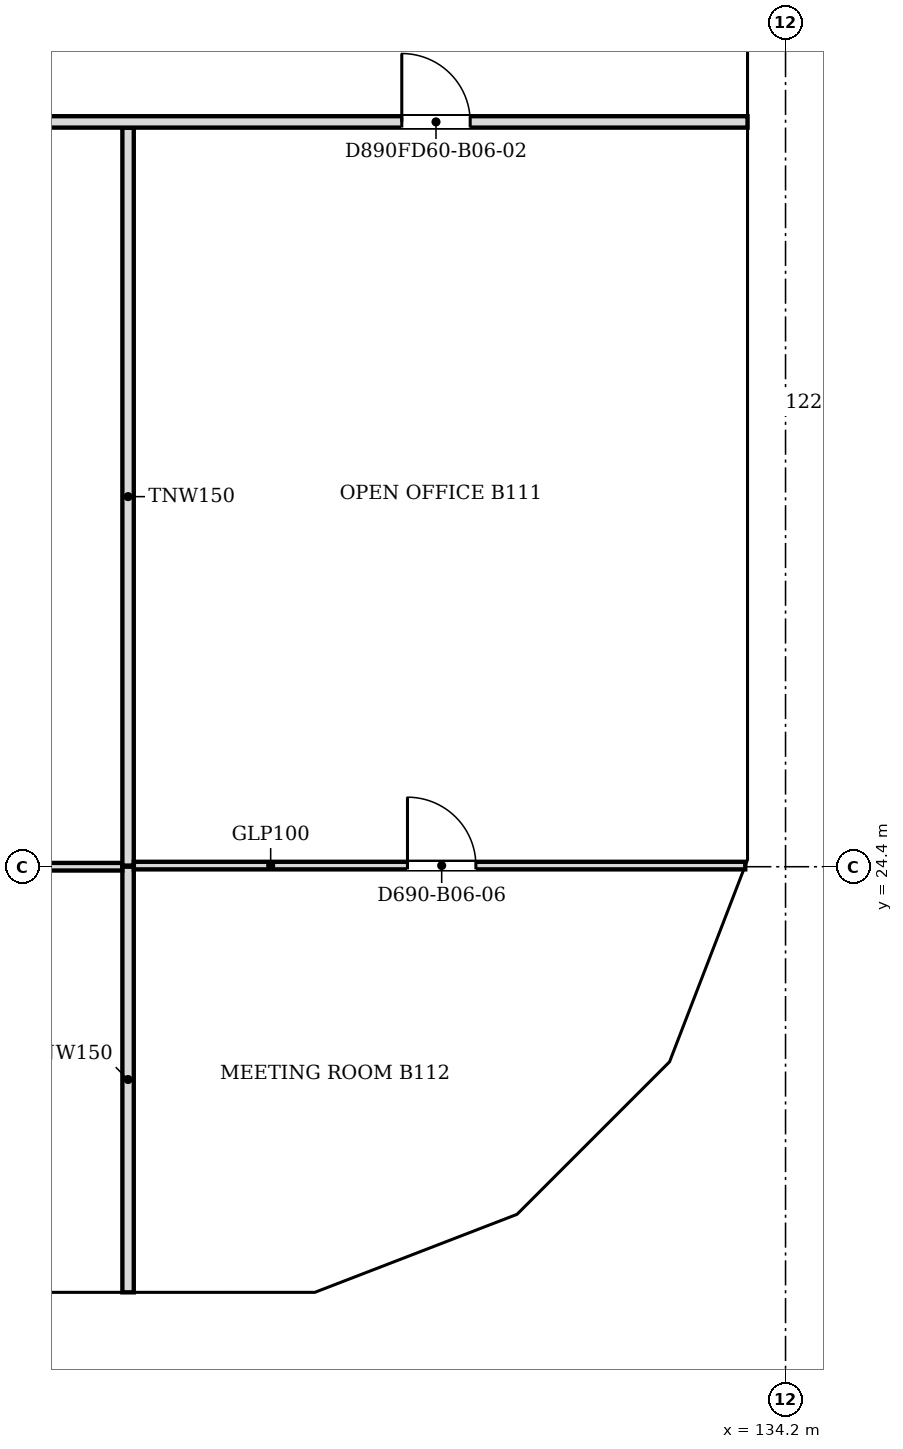
"""IFC4 building model, lengths in metres.
Left out: names, types, materials, properties, quantities, classifications, styles, units other than length and angle.
Written with IfcOpenShell. Run it as: python <this file> out.ifc"""

import sys

from ifc_helpers import new_model, si_unit, direction, frame, frame_2d, origin, place, context, subcontext, project, spatial, polyline, rectangle, outline, extrude, faceted_brep, source, transform, mapped, element, fill, save


model = new_model("IFC4")
c1 = context("Model", 3, precision=1e-05, world=origin(), true_north=direction((0.0, 1.0)))
c2 = subcontext(c1, "Body", "Model", "MODEL_VIEW")
j1 = project(units=[si_unit("LENGTHUNIT", "METRE"), si_unit("PLANEANGLEUNIT", "RADIAN")], contexts=[c1])
p1 = place(None, origin())
s1 = spatial("IfcSite", under=j1, at=p1, CompositionType="ELEMENT")
p2 = place(p1, origin())
s2 = spatial("IfcBuilding", under=s1, at=p2, CompositionType="ELEMENT")
p3 = place(p2, frame((0.0, 0.0, 56.2)))
s3 = spatial("IfcBuildingStorey", under=s2, at=p3, CompositionType="ELEMENT", Elevation=56.2)
m1 = source(origin(), c2, "Body", "SweptSolid", [
    extrude(outline(polyline([(3.05, 0.0), (6.1, 3.8), (3.05, 7.6), (0.0, 3.8), (3.05, 0.0)])), frame((0.0, 0.25, 0.0), z_axis=(0.0, -1.0, 0.0), x_axis=(1.0, 0.0, 0.0)), (0.0, 0.0, 1.0), 0.5),
])
p4 = place(p3, frame((118.95, 18.55, -3.8), z_axis=(0.0, 0.0, 1.0), x_axis=(1.0, 0.0, 0.0)))
e1 = element("IfcWall", 1, at=p4, inside=s3, PredefinedType="SOLIDWALL", context=c2, shape_type="MappedRepresentation", body=[
    mapped(m1, transform((0.0, 0.0, 0.0), scale=1.0)),
])
m2 = source(origin(), c2, "Body", "SweptSolid", [
    extrude(outline(polyline([(3.05, 0.399), (5.78, 3.8), (3.05, 7.201), (0.321, 3.8), (3.05, 0.399)])), frame((0.0, 0.26, 0.0), z_axis=(0.0, -1.0, 0.0), x_axis=(1.0, 0.0, 0.0)), (0.0, 0.0, 1.0), 0.52),
])
p5 = place(p4, origin())
e2 = element("IfcOpeningElement", 2, at=p5, cuts=e1, PredefinedType="OPENING", context=c2, shape_type="MappedRepresentation", body=[
    mapped(m2, transform((0.0, 0.0, 0.0), scale=1.0)),
])
m3 = source(origin(), c2, "Body", "Brep", [
    faceted_brep([(3.003, -0.25, 0.0), (3.05, -0.25, 0.06), (3.05, -0.25, 7.54), (3.003, -0.25, 7.6), (0.0, -0.25, 3.8), (0.0, 0.25, 3.8), (2.957, 0.25, 7.541), (2.957, 0.25, 0.059), (3.003, 0.0, 0.0), (3.003, 0.0, 7.6)], [[[0, 1, 2, 3, 4]], [[5, 6, 7]], [[1, 0, 8]], [[9, 3, 2]], [[6, 5, 4, 3, 9]], [[5, 7, 8, 0, 4]], [[1, 8, 7, 6, 9, 2]]]),
])
p6 = place(p3, frame((125.05, 18.55, -3.8), z_axis=(0.0, 0.0, 1.0), x_axis=(1.0, 0.0, 0.0)))
e3 = element("IfcWall", 3, at=p6, inside=s3, PredefinedType="SOLIDWALL", context=c2, shape_type="MappedRepresentation", body=[
    mapped(m3, transform((0.0, 0.0, 0.0), scale=1.0)),
])
m4 = source(origin(), c2, "Body", "SweptSolid", [
    extrude(outline(polyline([(2.803, 6.944), (0.319, 3.8), (2.803, 0.656), (2.803, 6.944)])), frame((0.0, 0.26, 0.0), z_axis=(0.0, -1.0, 0.0), x_axis=(1.0, 0.0, 0.0)), (0.0, 0.0, 1.0), 0.52),
])
p7 = place(p6, origin())
e4 = element("IfcOpeningElement", 4, at=p7, cuts=e3, PredefinedType="OPENING", context=c2, shape_type="MappedRepresentation", body=[
    mapped(m4, transform((0.0, 0.0, 0.0), scale=1.0)),
])
m5 = source(origin(), c2, "Body", "Brep", [
    faceted_brep([(0.047, -0.25, 0.0), (2.997, -0.25, 3.8), (0.047, -0.25, 7.6), (0.0, -0.25, 7.541), (0.0, -0.25, 0.059), (0.093, 0.25, 7.54), (2.944, 0.25, 3.868), (2.944, 0.25, 3.732), (0.093, 0.25, 0.06), (2.997, 0.0, 3.8), (0.047, 0.0, 0.0), (0.047, 0.0, 7.6)], [[[0, 1, 2, 3, 4]], [[5, 6, 7, 8]], [[8, 7, 9, 1, 0, 10]], [[6, 5, 11, 2, 1, 9]], [[3, 2, 11]], [[10, 0, 4]], [[8, 10, 4, 3, 11, 5]], [[9, 7, 6]]]),
])
p8 = place(p3, frame((128.01, 18.533, -3.8), z_axis=(0.0, 0.0, 1.0), x_axis=(0.932990326376, 0.359901446078, 0.0)))
e5 = element("IfcWall", 5, at=p8, inside=s3, PredefinedType="SOLIDWALL", context=c2, shape_type="MappedRepresentation", body=[
    mapped(m5, transform((0.0, 0.0, 0.0), scale=1.0)),
])
m6 = source(origin(), c2, "Body", "SweptSolid", [
    extrude(outline(polyline([(0.247, 0.665), (2.681, 3.8), (0.247, 6.935), (0.247, 0.665)])), frame((0.0, 0.26, 0.0), z_axis=(0.0, -1.0, 0.0), x_axis=(1.0, 0.0, 0.0)), (0.0, 0.0, 1.0), 0.52),
])
p9 = place(p8, origin())
e6 = element("IfcOpeningElement", 6, at=p9, cuts=e5, PredefinedType="OPENING", context=c2, shape_type="MappedRepresentation", body=[
    mapped(m6, transform((0.0, 0.0, 0.0), scale=1.0)),
])
m7 = source(origin(), c2, "Body", "Brep", [
    faceted_brep([(2.944, -0.25, 0.0), (2.997, -0.25, 0.068), (2.997, -0.25, 7.532), (2.944, -0.25, 7.6), (0.0, -0.25, 3.8), (0.053, 0.25, 3.868), (2.891, 0.25, 7.532), (2.891, 0.25, 0.068), (0.053, 0.25, 3.732), (2.944, 0.0, 0.0), (2.944, 0.0, 7.6), (0.0, 0.0, 3.8)], [[[0, 1, 2, 3, 4]], [[5, 6, 7, 8]], [[1, 0, 9]], [[10, 3, 2]], [[6, 5, 11, 4, 3, 10]], [[8, 7, 9, 0, 4, 11]], [[8, 11, 5]], [[1, 9, 7, 6, 10, 2]]]),
])
p10 = place(p3, frame((130.806, 19.612, -3.8), z_axis=(0.0, 0.0, 1.0), x_axis=(0.707106781187, 0.707106781187, 0.0)))
e7 = element("IfcWall", 7, at=p10, inside=s3, PredefinedType="SOLIDWALL", context=c2, shape_type="MappedRepresentation", body=[
    mapped(m7, transform((0.0, 0.0, 0.0), scale=1.0)),
])
m8 = source(origin(), c2, "Body", "SweptSolid", [
    extrude(outline(polyline([(2.744, 6.934), (0.316, 3.8), (2.744, 0.667), (2.744, 6.934)])), frame((0.0, 0.26, 0.0), z_axis=(0.0, -1.0, 0.0), x_axis=(1.0, 0.0, 0.0)), (0.0, 0.0, 1.0), 0.52),
])
p11 = place(p10, origin())
e8 = element("IfcOpeningElement", 8, at=p11, cuts=e7, PredefinedType="OPENING", context=c2, shape_type="MappedRepresentation", body=[
    mapped(m8, transform((0.0, 0.0, 0.0), scale=1.0)),
])
m9 = source(origin(), c2, "Body", "Brep", [
    faceted_brep([(0.053, -0.25, 0.0), (3.003, -0.25, 3.8), (0.053, -0.25, 7.6), (0.0, -0.25, 7.532), (0.0, -0.25, 0.068), (0.106, 0.25, 7.532), (2.957, 0.25, 3.86), (2.957, 0.25, 3.74), (0.106, 0.25, 0.068), (3.003, 0.0, 3.8), (0.053, 0.0, 0.0), (0.053, 0.0, 7.6)], [[[0, 1, 2, 3, 4]], [[5, 6, 7, 8]], [[8, 7, 9, 1, 0, 10]], [[6, 5, 11, 2, 1, 9]], [[3, 2, 11]], [[10, 0, 4]], [[8, 10, 4, 3, 11, 5]], [[9, 7, 6]]]),
])
p12 = place(p3, frame((132.869, 21.644, -3.8), z_axis=(0.0, 0.0, 1.0), x_axis=(0.359855894603, 0.933007896601, 0.0)))
e9 = element("IfcWall", 9, at=p12, inside=s3, PredefinedType="SOLIDWALL", context=c2, shape_type="MappedRepresentation", body=[
    mapped(m9, transform((0.0, 0.0, 0.0), scale=1.0)),
])
m10 = source(origin(), c2, "Body", "SweptSolid", [
    extrude(outline(polyline([(0.253, 0.665), (2.687, 3.8), (0.253, 6.935), (0.253, 0.665)])), frame((0.0, 0.26, 0.0), z_axis=(0.0, -1.0, 0.0), x_axis=(1.0, 0.0, 0.0)), (0.0, 0.0, 1.0), 0.52),
])
p13 = place(p12, origin())
e10 = element("IfcOpeningElement", 10, at=p13, cuts=e9, PredefinedType="OPENING", context=c2, shape_type="MappedRepresentation", body=[
    mapped(m10, transform((0.0, 0.0, 0.0), scale=1.0)),
])
m11 = source(origin(), c2, "Body", "Brep", [
    faceted_brep([(3.003, -0.25, 0.0), (6.053, -0.25, 3.8), (3.003, -0.25, 7.6), (0.0, -0.25, 3.8), (0.047, 0.25, 3.859), (3.003, 0.25, 7.6), (6.053, 0.25, 3.8), (3.003, 0.25, 0.0), (0.047, 0.25, 3.741), (0.0, 0.0, 3.8)], [[[0, 1, 2, 3]], [[4, 5, 6, 7, 8]], [[7, 6, 1, 0]], [[6, 5, 2, 1]], [[5, 4, 9, 3, 2]], [[8, 7, 0, 3, 9]], [[8, 9, 4]]]),
])
p14 = place(p3, frame((133.95, 24.447, -3.8), z_axis=(0.0, 0.0, 1.0), x_axis=(0.0, 1.0, 0.0)))
e11 = element("IfcWall", 11, at=p14, inside=s3, PredefinedType="SOLIDWALL", context=c2, shape_type="MappedRepresentation", body=[
    mapped(m11, transform((0.0, 0.0, 0.0), scale=1.0)),
])
m12 = source(origin(), c2, "Body", "SweptSolid", [
    extrude(outline(polyline([(3.005, 0.401), (5.733, 3.8), (3.005, 7.199), (0.319, 3.8), (3.005, 0.401)])), frame((0.0, 0.26, 0.0), z_axis=(0.0, -1.0, 0.0), x_axis=(1.0, 0.0, 0.0)), (0.0, 0.0, 1.0), 0.52),
])
p15 = place(p14, origin())
e12 = element("IfcOpeningElement", 12, at=p15, cuts=e11, PredefinedType="OPENING", context=c2, shape_type="MappedRepresentation", body=[
    mapped(m12, transform((0.0, 0.0, 0.0), scale=1.0)),
])
p16 = place(p3, frame((133.95, 30.5, -3.8), z_axis=(0.0, 0.0, 1.0), x_axis=(0.0, 1.0, 0.0)))
e13 = element("IfcWall", 13, at=p16, inside=s3, PredefinedType="SOLIDWALL", context=c2, shape_type="MappedRepresentation", body=[
    mapped(m1, transform((0.0, 0.0, 0.0), scale=1.0)),
])
p17 = place(p16, origin())
e14 = element("IfcOpeningElement", 14, at=p17, cuts=e13, PredefinedType="OPENING", context=c2, shape_type="MappedRepresentation", body=[
    mapped(m2, transform((0.0, 0.0, 0.0), scale=1.0)),
])
p18 = place(p2, frame((0.0, 0.0, 60.0)))
s4 = spatial("IfcBuildingStorey", under=s2, at=p18, CompositionType="ELEMENT", Elevation=60.0)
m13 = source(origin(), c2, "Body", "Brep", [
    faceted_brep([(3.05, -0.25, 0.0), (6.053, -0.25, 3.8), (3.05, -0.25, 7.6), (0.0, -0.25, 3.8), (0.0, 0.25, 3.8), (3.05, 0.25, 7.6), (6.007, 0.25, 3.859), (6.007, 0.25, 3.741), (3.05, 0.25, 0.0), (6.053, 0.0, 3.8)], [[[0, 1, 2, 3]], [[4, 5, 6, 7, 8]], [[8, 7, 9, 1, 0]], [[6, 5, 2, 1, 9]], [[5, 4, 3, 2]], [[4, 8, 0, 3]], [[9, 7, 6]]]),
])
p19 = place(p18, frame((122.0, 18.55, -3.8), z_axis=(0.0, 0.0, 1.0), x_axis=(1.0, 0.0, 0.0)))
e15 = element("IfcWall", 15, at=p19, inside=s4, PredefinedType="SOLIDWALL", context=c2, shape_type="MappedRepresentation", body=[
    mapped(m13, transform((0.0, 0.0, 0.0), scale=1.0)),
])
m14 = source(origin(), c2, "Body", "SweptSolid", [
    extrude(outline(polyline([(3.049, 0.401), (5.735, 3.8), (3.049, 7.199), (0.321, 3.8), (3.049, 0.401)])), frame((0.0, 0.26, 0.0), z_axis=(0.0, -1.0, 0.0), x_axis=(1.0, 0.0, 0.0)), (0.0, 0.0, 1.0), 0.52),
])
p20 = place(p19, origin())
e16 = element("IfcOpeningElement", 16, at=p20, cuts=e15, PredefinedType="OPENING", context=c2, shape_type="MappedRepresentation", body=[
    mapped(m14, transform((0.0, 0.0, 0.0), scale=1.0)),
])
m15 = source(origin(), c2, "Body", "Brep", [
    faceted_brep([(2.95, -0.25, 0.0), (3.003, -0.25, 0.068), (3.003, -0.25, 7.532), (2.95, -0.25, 7.6), (0.0, -0.25, 3.8), (0.047, 0.25, 3.86), (2.898, 0.25, 7.532), (2.898, 0.25, 0.068), (0.047, 0.25, 3.74), (2.95, 0.0, 0.0), (2.95, 0.0, 7.6), (0.0, 0.0, 3.8)], [[[0, 1, 2, 3, 4]], [[5, 6, 7, 8]], [[1, 0, 9]], [[10, 3, 2]], [[6, 5, 11, 4, 3, 10]], [[8, 7, 9, 0, 4, 11]], [[8, 11, 5]], [[1, 9, 7, 6, 10, 2]]]),
])
p21 = place(p18, frame((128.053, 18.55, -3.8), z_axis=(0.0, 0.0, 1.0), x_axis=(0.933007896601, 0.359855894603, 0.0)))
e17 = element("IfcWall", 17, at=p21, inside=s4, PredefinedType="SOLIDWALL", context=c2, shape_type="MappedRepresentation", body=[
    mapped(m15, transform((0.0, 0.0, 0.0), scale=1.0)),
])
m16 = source(origin(), c2, "Body", "SweptSolid", [
    extrude(outline(polyline([(2.75, 6.935), (0.316, 3.8), (2.75, 0.665), (2.75, 6.935)])), frame((0.0, 0.26, 0.0), z_axis=(0.0, -1.0, 0.0), x_axis=(1.0, 0.0, 0.0)), (0.0, 0.0, 1.0), 0.52),
])
p22 = place(p21, origin())
e18 = element("IfcOpeningElement", 18, at=p22, cuts=e17, PredefinedType="OPENING", context=c2, shape_type="MappedRepresentation", body=[
    mapped(m16, transform((0.0, 0.0, 0.0), scale=1.0)),
])
m17 = source(origin(), c2, "Body", "Brep", [
    faceted_brep([(0.053, -0.25, 0.0), (2.997, -0.25, 3.8), (0.053, -0.25, 7.6), (0.0, -0.25, 7.532), (0.0, -0.25, 0.068), (0.106, 0.25, 7.532), (2.944, 0.25, 3.868), (2.944, 0.25, 3.732), (0.106, 0.25, 0.068), (2.997, 0.0, 3.8), (0.053, 0.0, 0.0), (0.053, 0.0, 7.6)], [[[0, 1, 2, 3, 4]], [[5, 6, 7, 8]], [[8, 7, 9, 1, 0, 10]], [[6, 5, 11, 2, 1, 9]], [[3, 2, 11]], [[10, 0, 4]], [[8, 10, 4, 3, 11, 5]], [[9, 7, 6]]]),
])
p23 = place(p18, frame((130.769, 19.574, -3.8), z_axis=(0.0, 0.0, 1.0), x_axis=(0.707106781187, 0.707106781187, 0.0)))
e19 = element("IfcWall", 19, at=p23, inside=s4, PredefinedType="SOLIDWALL", context=c2, shape_type="MappedRepresentation", body=[
    mapped(m17, transform((0.0, 0.0, 0.0), scale=1.0)),
])
m18 = source(origin(), c2, "Body", "SweptSolid", [
    extrude(outline(polyline([(0.253, 0.666), (2.681, 3.8), (0.253, 6.934), (0.253, 0.666)])), frame((0.0, 0.26, 0.0), z_axis=(0.0, -1.0, 0.0), x_axis=(1.0, 0.0, 0.0)), (0.0, 0.0, 1.0), 0.52),
])
p24 = place(p23, origin())
e20 = element("IfcOpeningElement", 20, at=p24, cuts=e19, PredefinedType="OPENING", context=c2, shape_type="MappedRepresentation", body=[
    mapped(m18, transform((0.0, 0.0, 0.0), scale=1.0)),
])
m19 = source(origin(), c2, "Body", "Brep", [
    faceted_brep([(2.95, -0.25, 0.0), (2.997, -0.25, 0.059), (2.997, -0.25, 7.541), (2.95, -0.25, 7.6), (0.0, -0.25, 3.8), (0.053, 0.25, 3.868), (2.904, 0.25, 7.54), (2.904, 0.25, 0.06), (0.053, 0.25, 3.732), (2.95, 0.0, 0.0), (2.95, 0.0, 7.6), (0.0, 0.0, 3.8)], [[[0, 1, 2, 3, 4]], [[5, 6, 7, 8]], [[1, 0, 9]], [[10, 3, 2]], [[6, 5, 11, 4, 3, 10]], [[8, 7, 9, 0, 4, 11]], [[8, 11, 5]], [[1, 9, 7, 6, 10, 2]]]),
])
p25 = place(p18, frame((132.888, 21.694, -3.8), z_axis=(0.0, 0.0, 1.0), x_axis=(0.359901446078, 0.932990326376, 0.0)))
e21 = element("IfcWall", 21, at=p25, inside=s4, PredefinedType="SOLIDWALL", context=c2, shape_type="MappedRepresentation", body=[
    mapped(m19, transform((0.0, 0.0, 0.0), scale=1.0)),
])
p26 = place(p25, origin())
e22 = element("IfcOpeningElement", 22, at=p26, cuts=e21, PredefinedType="OPENING", context=c2, shape_type="MappedRepresentation", body=[
    mapped(m16, transform((0.0, 0.0, 0.0), scale=1.0)),
])
m20 = source(origin(), c2, "Body", "Brep", [
    faceted_brep([(0.047, -0.25, 0.0), (3.05, -0.25, 3.8), (0.047, -0.25, 7.6), (0.0, -0.25, 7.54), (0.0, -0.25, 0.06), (0.093, 0.25, 7.541), (3.05, 0.25, 3.8), (0.093, 0.25, 0.059), (0.047, 0.0, 0.0), (0.047, 0.0, 7.6)], [[[0, 1, 2, 3, 4]], [[5, 6, 7]], [[7, 6, 1, 0, 8]], [[6, 5, 9, 2, 1]], [[3, 2, 9]], [[8, 0, 4]], [[7, 8, 4, 3, 9, 5]]]),
])
p27 = place(p18, frame((133.95, 24.4, -3.8), z_axis=(0.0, 0.0, 1.0), x_axis=(0.0, 1.0, 0.0)))
e23 = element("IfcWall", 23, at=p27, inside=s4, PredefinedType="SOLIDWALL", context=c2, shape_type="MappedRepresentation", body=[
    mapped(m20, transform((0.0, 0.0, 0.0), scale=1.0)),
])
m21 = source(origin(), c2, "Body", "SweptSolid", [
    extrude(outline(polyline([(0.247, 0.656), (2.731, 3.8), (0.247, 6.944), (0.247, 0.656)])), frame((0.0, 0.26, 0.0), z_axis=(0.0, -1.0, 0.0), x_axis=(1.0, 0.0, 0.0)), (0.0, 0.0, 1.0), 0.52),
])
p28 = place(p27, origin())
e24 = element("IfcOpeningElement", 24, at=p28, cuts=e23, PredefinedType="OPENING", context=c2, shape_type="MappedRepresentation", body=[
    mapped(m21, transform((0.0, 0.0, 0.0), scale=1.0)),
])
p29 = place(p18, frame((133.95, 27.45, -3.8), z_axis=(0.0, 0.0, 1.0), x_axis=(0.0, 1.0, 0.0)))
e25 = element("IfcWall", 25, at=p29, inside=s4, PredefinedType="SOLIDWALL", context=c2, shape_type="MappedRepresentation", body=[
    mapped(m1, transform((0.0, 0.0, 0.0), scale=1.0)),
])
p30 = place(p29, origin())
e26 = element("IfcOpeningElement", 26, at=p30, cuts=e25, PredefinedType="OPENING", context=c2, shape_type="MappedRepresentation", body=[
    mapped(m2, transform((0.0, 0.0, 0.0), scale=1.0)),
])
m22 = source(origin(), c2, "Body", "Brep", [
    faceted_brep([(3.05, -0.25, 0.0), (6.1, -0.25, 3.8), (6.1, -0.25, 3.8), (3.05, -0.25, 7.6), (0.0, -0.25, 3.8), (0.0, 0.25, 3.8), (3.05, 0.25, 7.6), (6.1, 0.25, 3.8), (6.1, 0.25, 3.8), (3.05, 0.25, 0.0)], [[[0, 1, 2, 3, 4]], [[5, 6, 7, 8, 9]], [[9, 8, 1, 0]], [[7, 6, 3, 2]], [[6, 5, 4, 3]], [[5, 9, 0, 4]], [[1, 8, 7, 2]]]),
])
p31 = place(p18, frame((133.95, 33.55, -3.8), z_axis=(0.0, 0.0, 1.0), x_axis=(0.0, 1.0, 0.0)))
e27 = element("IfcWall", 27, at=p31, inside=s4, PredefinedType="SOLIDWALL", context=c2, shape_type="MappedRepresentation", body=[
    mapped(m22, transform((0.0, 0.0, 0.0), scale=1.0)),
])
p32 = place(p31, origin())
e28 = element("IfcOpeningElement", 28, at=p32, cuts=e27, PredefinedType="OPENING", context=c2, shape_type="MappedRepresentation", body=[
    mapped(m2, transform((0.0, 0.0, 0.0), scale=1.0)),
])
p33 = place(p3, frame((125.55, 18.8, 0.0), z_axis=(0.0, 0.0, 1.0), x_axis=(0.0, 1.0, 0.0)))
e29 = element("IfcWall", 29, at=p33, inside=s3, PredefinedType="PARTITIONING", context=c2, shape_type="SweptSolid", body=[
    extrude(rectangle(XDim=5.6, YDim=0.15, at=frame_2d((2.8, 0.0))), origin(), (0.0, 0.0, 1.0), 3.067),
])
p34 = place(p3, frame((122.451, 24.4, 0.0), z_axis=(0.0, 0.0, 1.0), x_axis=(1.0, 0.0, 0.0)))
e30 = element("IfcWall", 30, at=p34, inside=s3, PredefinedType="PARTITIONING", context=c2, shape_type="SweptSolid", body=[
    extrude(rectangle(XDim=3.023, YDim=0.1, at=frame_2d((1.512, 0.0))), origin(), (0.0, 0.0, 1.0), 3.067),
])
p35 = place(p3, frame((125.55, 24.415, 0.0), z_axis=(0.0, 0.0, 1.0), x_axis=(0.0, 1.0, 0.0)))
e31 = element("IfcWall", 31, at=p35, inside=s3, PredefinedType="PARTITIONING", context=c2, shape_type="SweptSolid", body=[
    extrude(rectangle(XDim=9.709, YDim=0.15, at=frame_2d((4.854, 0.0))), origin(), (0.0, 0.0, 1.0), 3.067),
])
p36 = place(p3, frame((133.67, 24.415, 0.0), z_axis=(0.0, 0.0, 1.0), x_axis=(-1.0, 0.0, 0.0)))
e32 = element("IfcWall", 32, at=p36, inside=s3, PredefinedType="PARTITIONING", context=c2, shape_type="SweptSolid", body=[
    extrude(rectangle(XDim=8.044, YDim=0.1, at=frame_2d((4.022, 0.0))), origin(), (0.0, 0.0, 1.0), 3.067),
])
m23 = source(origin(), c2, "Body", "SweptSolid", [
    extrude(rectangle(XDim=0.9, YDim=2.1, at=frame_2d((0.45, 1.05))), frame((0.0, 0.06, 0.0), z_axis=(0.0, -1.0, 0.0), x_axis=(1.0, 0.0, 0.0)), (0.0, 0.0, 1.0), 0.12),
])
p37 = place(p36, frame((3.544, 0.0, 0.0)))
e33 = element("IfcOpeningElement", 33, at=p37, cuts=e32, PredefinedType="OPENING", context=c2, shape_type="MappedRepresentation", body=[
    mapped(m23, transform((0.0, 0.0, 0.0), scale=1.0)),
])
p38 = place(p3, frame((133.7, 34.2, 0.0), z_axis=(0.0, 0.0, 1.0), x_axis=(-1.0, 0.0, 0.0)))
e34 = element("IfcWall", 34, at=p38, inside=s3, PredefinedType="PARTITIONING", context=c2, shape_type="SweptSolid", body=[
    extrude(rectangle(XDim=47.8, YDim=0.15, at=frame_2d((23.9, 0.0))), origin(), (0.0, 0.0, 1.0), 3.067),
])
m24 = source(origin(), c2, "Body", "SweptSolid", [
    extrude(rectangle(XDim=0.9, YDim=2.1, at=frame_2d((0.45, 1.05))), frame((0.0, 0.085, 0.0), z_axis=(0.0, -1.0, 0.0), x_axis=(1.0, 0.0, 0.0)), (0.0, 0.0, 1.0), 0.17),
])
p39 = place(p38, frame((22.949, 0.0, 0.0)))
e35 = element("IfcOpeningElement", 35, at=p39, cuts=e34, PredefinedType="OPENING", context=c2, shape_type="MappedRepresentation", body=[
    mapped(m24, transform((0.0, 0.0, 0.0), scale=1.0)),
])
p40 = place(p38, frame((3.649, 0.0, 0.0)))
e36 = element("IfcOpeningElement", 36, at=p40, cuts=e34, PredefinedType="OPENING", context=c2, shape_type="MappedRepresentation", body=[
    mapped(m24, transform((0.0, 0.0, 0.0), scale=1.0)),
])
p41 = place(p38, frame((30.799, 0.0, 0.0)))
e37 = element("IfcOpeningElement", 37, at=p41, cuts=e34, PredefinedType="OPENING", context=c2, shape_type="MappedRepresentation", body=[
    mapped(m24, transform((0.0, 0.0, 0.0), scale=1.0)),
])
p42 = place(p38, frame((41.5, 0.0, 0.0)))
e38 = element("IfcOpeningElement", 38, at=p42, cuts=e34, PredefinedType="OPENING", context=c2, shape_type="MappedRepresentation", body=[
    mapped(m24, transform((0.0, 0.0, 0.0), scale=1.0)),
])
p43 = place(p38, frame((13.85, 0.0, 0.0)))
e39 = element("IfcOpeningElement", 39, at=p43, cuts=e34, PredefinedType="OPENING", context=c2, shape_type="MappedRepresentation", body=[
    mapped(m24, transform((0.0, 0.0, 0.0), scale=1.0)),
])
m25 = source(origin(), c2, "Body", "SweptSolid", [
    extrude(rectangle(XDim=0.9, YDim=2.1, at=frame_2d((0.45, 1.05))), frame((0.0, 0.025, 0.0), z_axis=(0.0, -1.0, 0.0), x_axis=(1.0, 0.0, 0.0)), (0.0, 0.0, 1.0), 0.05),
])
p44 = place(p37, origin())
e40 = element("IfcDoor", 40, at=p44, inside=s3, OperationType="SINGLE_SWING_RIGHT", PredefinedType="DOOR", context=c2, shape_type="MappedRepresentation", body=[
    mapped(m25, transform((0.0, 0.0, 0.0), scale=1.0)),
])
fill(e33, e40)
p45 = place(p40, origin())
e41 = element("IfcDoor", 41, at=p45, inside=s3, OperationType="SINGLE_SWING_RIGHT", PredefinedType="DOOR", context=c2, shape_type="MappedRepresentation", body=[
    mapped(m25, transform((0.0, 0.0, 0.0), scale=1.0)),
])
fill(e36, e41)
save(model, sys.argv[1])
